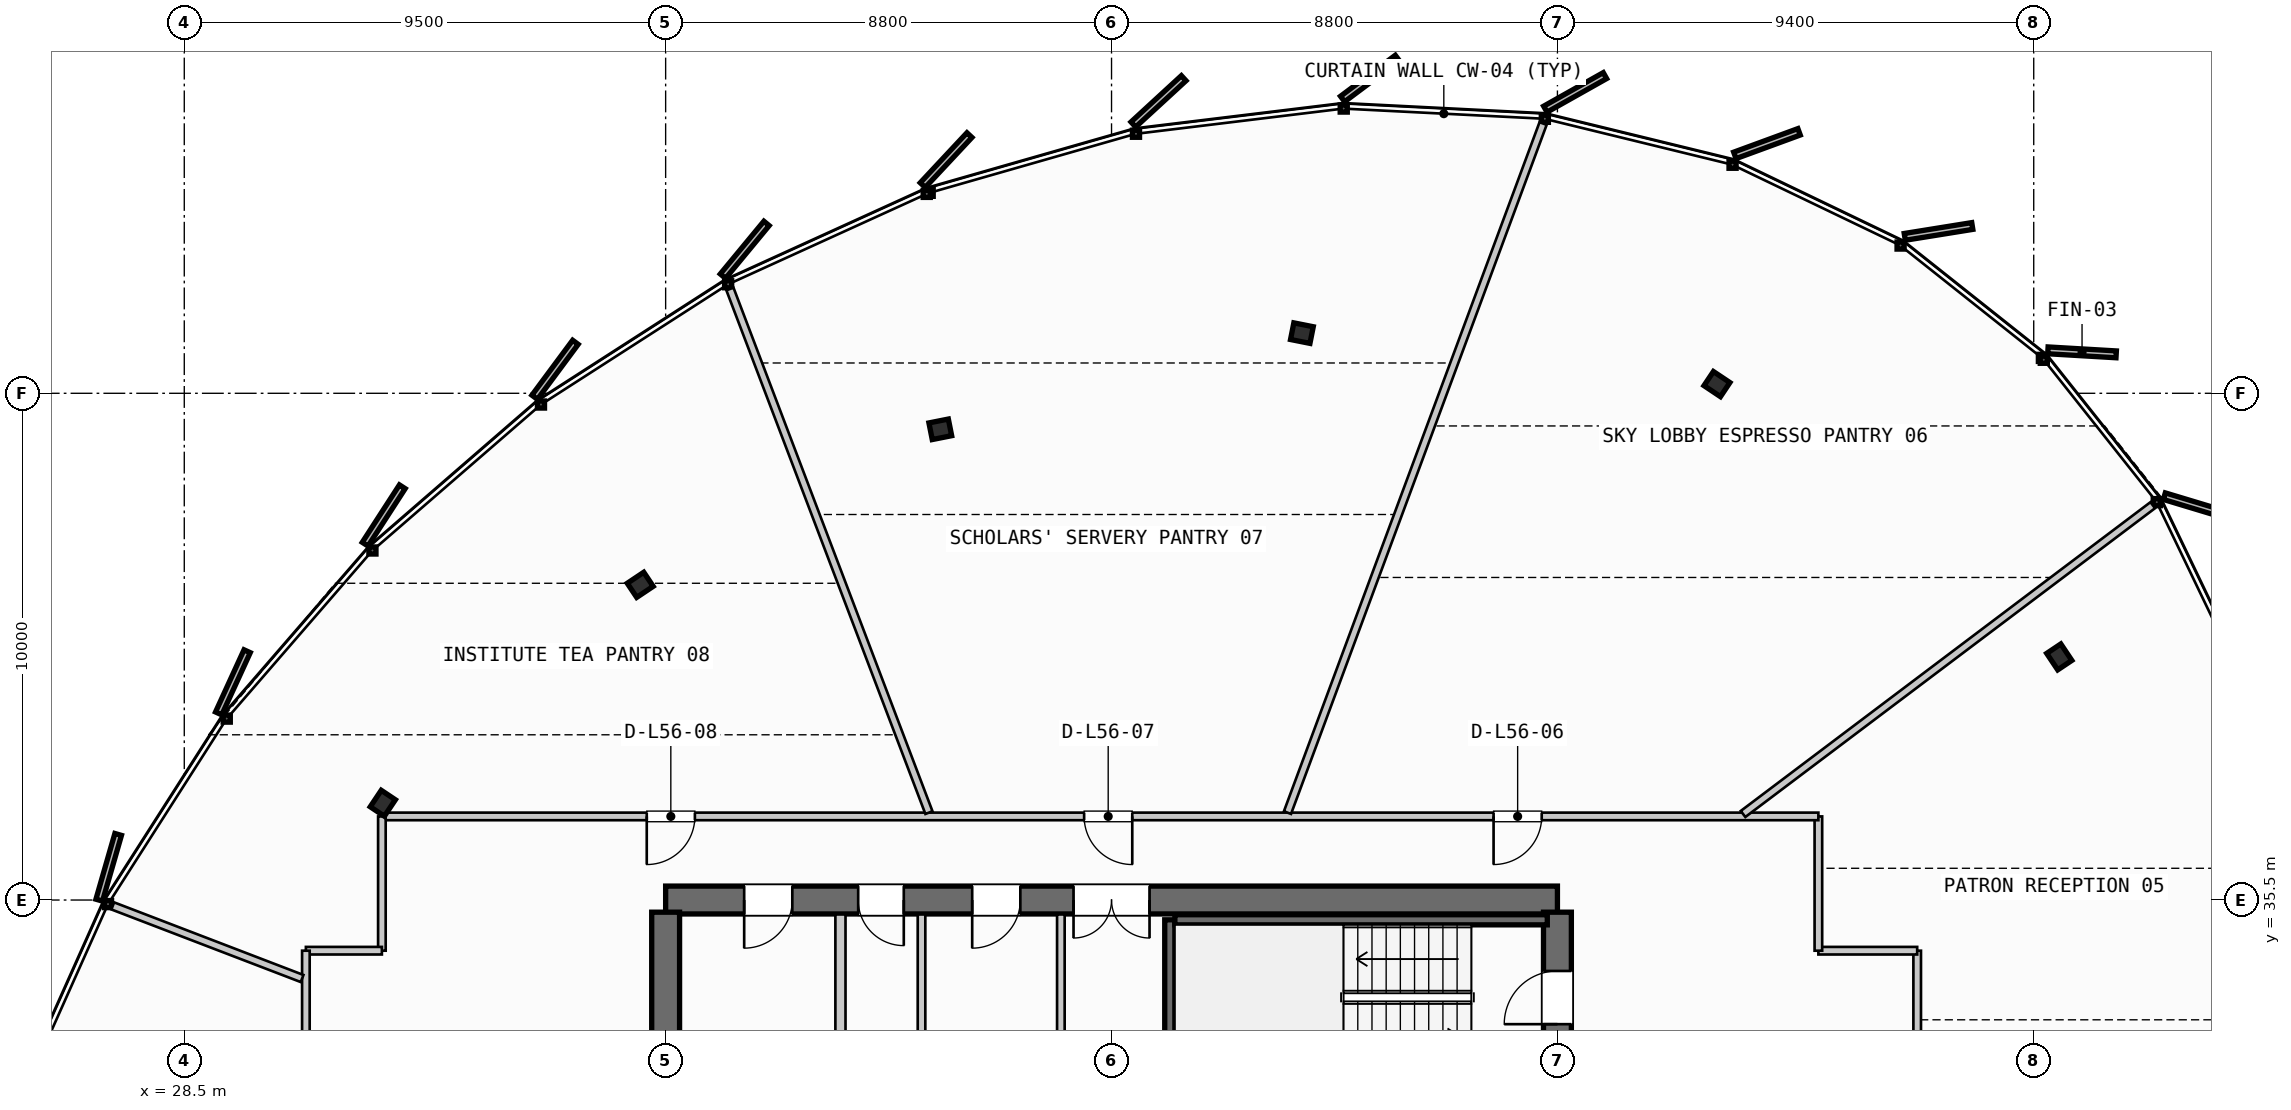
"""IFC4 building model, lengths in metres.
Left out: names, types, materials, properties, quantities, classifications, styles, units other than length and angle.
Written with IfcOpenShell. Run it as: python <this file> out.ifc"""

import sys

from ifc_helpers import new_model, si_unit, direction, frame, frame_2d, origin, origin_2d, place, context, subcontext, project, spatial, rectangle, i_section, extrude, source, transform, mapped, element, fill, save


model = new_model("IFC4")
c1 = context("Model", 3, precision=1e-05, world=origin(), true_north=direction((0.0, 1.0)))
c2 = subcontext(c1, "Body", "Model", "MODEL_VIEW")
j1 = project(units=[si_unit("LENGTHUNIT", "METRE"), si_unit("PLANEANGLEUNIT", "RADIAN")], contexts=[c1])
p1 = place(None, origin())
s1 = spatial("IfcSite", under=j1, at=p1, CompositionType="ELEMENT")
p2 = place(p1, origin())
s2 = spatial("IfcBuilding", under=s1, at=p2, CompositionType="ELEMENT")
p3 = place(p2, frame((0.0, 0.0, 214.9)))
s3 = spatial("IfcBuildingStorey", under=s2, at=p3, CompositionType="ELEMENT", Elevation=214.9)
p4 = place(p3, frame((55.6, 35.5, 0.0), z_axis=(0.0, 0.0, 1.0), x_axis=(-1.0, 0.0, 0.0)))
e1 = element("IfcWall", 1, at=p4, inside=s3, PredefinedType="SHEAR", context=c2, shape_type="SweptSolid", body=[
    extrude(rectangle(XDim=17.6, YDim=0.55, at=frame_2d((8.8, 0.0))), origin(), (0.0, 0.0, 1.0), 3.24),
])
p5 = place(p4, frame((8.05, 0.0, 0.0)))
e2 = element("IfcOpeningElement", 2, at=p5, cuts=e1, PredefinedType="OPENING", context=c2, shape_type="SweptSolid", body=[
    extrude(rectangle(XDim=1.5, YDim=2.2, at=frame_2d((0.75, 1.1))), frame((0.0, 0.285, 0.0), z_axis=(0.0, -1.0, 0.0), x_axis=(1.0, 0.0, 0.0)), (0.0, 0.0, 1.0), 0.57),
])
p6 = place(p4, frame((15.1, 0.0, 0.0)))
e3 = element("IfcOpeningElement", 3, at=p6, cuts=e1, PredefinedType="OPENING", context=c2, shape_type="SweptSolid", body=[
    extrude(rectangle(XDim=0.95, YDim=2.15, at=frame_2d((0.475, 1.075))), frame((0.0, 0.285, 0.0), z_axis=(0.0, -1.0, 0.0), x_axis=(1.0, 0.0, 0.0)), (0.0, 0.0, 1.0), 0.57),
])
p7 = place(p4, frame((12.9, 0.0, 0.0)))
e4 = element("IfcOpeningElement", 4, at=p7, cuts=e1, PredefinedType="OPENING", context=c2, shape_type="SweptSolid", body=[
    extrude(rectangle(XDim=0.9, YDim=2.15, at=frame_2d((0.45, 1.075))), frame((0.0, 0.285, 0.0), z_axis=(0.0, -1.0, 0.0), x_axis=(1.0, 0.0, 0.0)), (0.0, 0.0, 1.0), 0.57),
])
p8 = place(p4, frame((10.6, 0.0, 0.0)))
e5 = element("IfcOpeningElement", 5, at=p8, cuts=e1, PredefinedType="OPENING", context=c2, shape_type="SweptSolid", body=[
    extrude(rectangle(XDim=0.95, YDim=2.15, at=frame_2d((0.475, 1.075))), frame((0.0, 0.285, 0.0), z_axis=(0.0, -1.0, 0.0), x_axis=(1.0, 0.0, 0.0)), (0.0, 0.0, 1.0), 0.57),
])
p9 = place(p3, frame((38.0, 35.26, 0.0), z_axis=(0.0, 0.0, 1.0), x_axis=(0.0, -1.0, 0.0)))
e6 = element("IfcWall", 6, at=p9, inside=s3, PredefinedType="SHEAR", context=c2, shape_type="SweptSolid", body=[
    extrude(rectangle(XDim=14.92, YDim=0.55, at=frame_2d((7.46, 0.0))), origin(), (0.0, 0.0, 1.0), 3.24),
])
p10 = place(p9, frame((5.21, 0.0, 0.0)))
e7 = element("IfcOpeningElement", 7, at=p10, cuts=e6, PredefinedType="OPENING", context=c2, shape_type="SweptSolid", body=[
    extrude(rectangle(XDim=1.1, YDim=2.2, at=frame_2d((0.55, 1.1))), frame((0.0, 0.285, 0.0), z_axis=(0.0, -1.0, 0.0), x_axis=(1.0, 0.0, 0.0)), (0.0, 0.0, 1.0), 0.57),
])
p11 = place(p3, frame((55.6, 20.34, 0.0), z_axis=(0.0, 0.0, 1.0), x_axis=(0.0, 1.0, 0.0)))
e8 = element("IfcWall", 8, at=p11, inside=s3, PredefinedType="SHEAR", context=c2, shape_type="SweptSolid", body=[
    extrude(rectangle(XDim=14.92, YDim=0.55, at=frame_2d((7.46, 0.0))), origin(), (0.0, 0.0, 1.0), 3.24),
])
p12 = place(p11, frame((12.71, 0.0, 0.0)))
e9 = element("IfcOpeningElement", 9, at=p12, cuts=e8, PredefinedType="OPENING", context=c2, shape_type="SweptSolid", body=[
    extrude(rectangle(XDim=1.05, YDim=2.15, at=frame_2d((0.525, 1.075))), frame((0.0, 0.285, 0.0), z_axis=(0.0, -1.0, 0.0), x_axis=(1.0, 0.0, 0.0)), (0.0, 0.0, 1.0), 0.57),
])
p13 = place(p11, frame((8.61, 0.0, 0.0)))
e10 = element("IfcOpeningElement", 10, at=p13, cuts=e8, PredefinedType="OPENING", context=c2, shape_type="SweptSolid", body=[
    extrude(rectangle(XDim=1.1, YDim=2.2, at=frame_2d((0.55, 1.1))), frame((0.0, 0.285, 0.0), z_axis=(0.0, -1.0, 0.0), x_axis=(1.0, 0.0, 0.0)), (0.0, 0.0, 1.0), 0.57),
])
m1 = source(origin(), c2, "Body", "SweptSolid", [
    extrude(i_section(OverallWidth=0.391, OverallDepth=0.335, WebThickness=0.023, FlangeThickness=0.034, FilletRadius=0.015, at=origin_2d()), origin(), (0.0, 0.0, 1.0), 3.24),
])
for number, where, z_axis, x_axis in (
    (11, (65.504, 40.298, 0.0), (0.0, 0.0, 1.0), (0.831, 0.556, 0.0)),
    (12, (58.748, 45.681, 0.0), (0.0, 0.0, 1.0), (0.556, 0.831, 0.0)),
    (13, (50.557, 46.688, 0.0), (0.0, 0.0, 1.0), (0.195, 0.981, 0.0)),
    (14, (43.421, 44.789, 0.0), (0.0, 0.0, 1.0), (-0.195, 0.981, 0.0)),
    (15, (37.499, 41.72, 0.0), (0.0, 0.0, 1.0), (-0.556, 0.831, 0.0)),
    (16, (32.418, 37.409, 0.0), (0.0, 0.0, 1.0), (-0.831, 0.556, 0.0)),
):
    element("IfcColumn", number, at=place(p3, frame(where, z_axis=z_axis, x_axis=x_axis)), inside=s3, PredefinedType="COLUMN", context=c2, shape_type="MappedRepresentation", body=[
        mapped(m1, transform((0.0, 0.0, 0.0), scale=1.0)),
    ])
p14 = place(p3, frame((47.95, 32.05, 0.0), z_axis=(0.0, 0.0, 1.0), x_axis=(0.0, 1.0, 0.0)))
e17 = element("IfcWall", 17, at=p14, inside=s3, PredefinedType="SHEAR", context=c2, shape_type="SweptSolid", body=[
    extrude(rectangle(XDim=3.06, YDim=0.2, at=frame_2d((1.53, 0.0))), origin(), (0.0, 0.0, 1.0), 3.24),
])
p15 = place(p3, frame((48.05, 35.11, 0.0), z_axis=(0.0, 0.0, 1.0), x_axis=(1.0, 0.0, 0.0)))
e18 = element("IfcWall", 18, at=p15, inside=s3, PredefinedType="SHEAR", context=c2, shape_type="SweptSolid", body=[
    extrude(rectangle(XDim=7.35, YDim=0.2, at=frame_2d((3.675, 0.0))), origin(), (0.0, 0.0, 1.0), 3.24),
])
p16 = place(p3, frame((41.45, 31.85, 0.0), z_axis=(0.0, 0.0, 1.0), x_axis=(0.0, 1.0, 0.0)))
e19 = element("IfcWall", 19, at=p16, inside=s3, PredefinedType="PARTITIONING", context=c2, shape_type="SweptSolid", body=[
    extrude(rectangle(XDim=3.365, YDim=0.2, at=frame_2d((1.683, 0.0))), origin(), (0.0, 0.0, 1.0), 2.295),
])
p17 = place(p3, frame((45.8, 31.85, 0.0), z_axis=(0.0, 0.0, 1.0), x_axis=(0.0, 1.0, 0.0)))
e20 = element("IfcWall", 20, at=p17, inside=s3, PredefinedType="PARTITIONING", context=c2, shape_type="SweptSolid", body=[
    extrude(rectangle(XDim=3.365, YDim=0.15, at=frame_2d((1.683, 0.0))), origin(), (0.0, 0.0, 1.0), 2.295),
])
p18 = place(p3, frame((43.05, 31.85, 0.0), z_axis=(0.0, 0.0, 1.0), x_axis=(0.0, 1.0, 0.0)))
e21 = element("IfcWall", 21, at=p18, inside=s3, PredefinedType="PLUMBINGWALL", context=c2, shape_type="SweptSolid", body=[
    extrude(rectangle(XDim=3.365, YDim=0.15, at=frame_2d((1.683, 0.0))), origin(), (0.0, 0.0, 1.0), 2.295),
])
p19 = place(p3, frame((62.7, 32.8, 0.0), z_axis=(0.0, 0.0, 1.0), x_axis=(0.0, 1.0, 0.0)))
e22 = element("IfcWall", 22, at=p19, inside=s3, PredefinedType="PARTITIONING", context=c2, shape_type="SweptSolid", body=[
    extrude(rectangle(XDim=1.7, YDim=0.15, at=frame_2d((0.85, 0.0))), origin(), (0.0, 0.0, 1.0), 2.295),
])
p20 = place(p3, frame((62.7, 34.5, 0.0), z_axis=(0.0, 0.0, 1.0), x_axis=(-1.0, 0.0, 0.0)))
e23 = element("IfcWall", 23, at=p20, inside=s3, PredefinedType="PARTITIONING", context=c2, shape_type="SweptSolid", body=[
    extrude(rectangle(XDim=1.95, YDim=0.15, at=frame_2d((0.975, 0.0))), origin(), (0.0, 0.0, 1.0), 2.295),
])
p21 = place(p3, frame((60.75, 34.5, 0.0), z_axis=(0.0, 0.0, 1.0), x_axis=(0.0, 1.0, 0.0)))
e24 = element("IfcWall", 24, at=p21, inside=s3, PredefinedType="PARTITIONING", context=c2, shape_type="SweptSolid", body=[
    extrude(rectangle(XDim=2.65, YDim=0.15, at=frame_2d((1.325, 0.0))), origin(), (0.0, 0.0, 1.0), 2.295),
])
p22 = place(p3, frame((60.75, 37.15, 0.0), z_axis=(0.0, 0.0, 1.0), x_axis=(-1.0, 0.0, 0.0)))
e25 = element("IfcWall", 25, at=p22, inside=s3, PredefinedType="PARTITIONING", context=c2, shape_type="SweptSolid", body=[
    extrude(rectangle(XDim=28.35, YDim=0.15, at=frame_2d((14.175, 0.0))), origin(), (0.0, 0.0, 1.0), 2.295),
])
p23 = place(p22, frame((5.46, 0.0, 0.0)))
e26 = element("IfcOpeningElement", 26, at=p23, cuts=e25, PredefinedType="OPENING", context=c2, shape_type="SweptSolid", body=[
    extrude(rectangle(XDim=0.95, YDim=2.15, at=frame_2d((0.475, 1.075))), frame((0.0, 0.085, 0.0), z_axis=(0.0, -1.0, 0.0), x_axis=(1.0, 0.0, 0.0)), (0.0, 0.0, 1.0), 0.17),
])
p24 = place(p22, frame((13.541, 0.0, 0.0)))
e27 = element("IfcOpeningElement", 27, at=p24, cuts=e25, PredefinedType="OPENING", context=c2, shape_type="SweptSolid", body=[
    extrude(rectangle(XDim=0.95, YDim=2.15, at=frame_2d((0.475, 1.075))), frame((0.0, 0.085, 0.0), z_axis=(0.0, -1.0, 0.0), x_axis=(1.0, 0.0, 0.0)), (0.0, 0.0, 1.0), 0.17),
])
p25 = place(p22, frame((22.173, 0.0, 0.0)))
e28 = element("IfcOpeningElement", 28, at=p25, cuts=e25, PredefinedType="OPENING", context=c2, shape_type="SweptSolid", body=[
    extrude(rectangle(XDim=0.95, YDim=2.15, at=frame_2d((0.475, 1.075))), frame((0.0, 0.085, 0.0), z_axis=(0.0, -1.0, 0.0), x_axis=(1.0, 0.0, 0.0)), (0.0, 0.0, 1.0), 0.17),
])
p26 = place(p3, frame((32.4, 37.15, 0.0), z_axis=(0.0, 0.0, 1.0), x_axis=(0.0, -1.0, 0.0)))
e29 = element("IfcWall", 29, at=p26, inside=s3, PredefinedType="PARTITIONING", context=c2, shape_type="SweptSolid", body=[
    extrude(rectangle(XDim=2.65, YDim=0.15, at=frame_2d((1.325, 0.0))), origin(), (0.0, 0.0, 1.0), 2.295),
])
p27 = place(p3, frame((32.4, 34.5, 0.0), z_axis=(0.0, 0.0, 1.0), x_axis=(-1.0, 0.0, 0.0)))
e30 = element("IfcWall", 30, at=p27, inside=s3, PredefinedType="PARTITIONING", context=c2, shape_type="SweptSolid", body=[
    extrude(rectangle(XDim=1.5, YDim=0.15, at=frame_2d((0.75, 0.0))), origin(), (0.0, 0.0, 1.0), 2.295),
])
p28 = place(p3, frame((30.9, 34.5, 0.0), z_axis=(0.0, 0.0, 1.0), x_axis=(0.0, -1.0, 0.0)))
e31 = element("IfcWall", 31, at=p28, inside=s3, PredefinedType="PARTITIONING", context=c2, shape_type="SweptSolid", body=[
    extrude(rectangle(XDim=1.7, YDim=0.15, at=frame_2d((0.85, 0.0))), origin(), (0.0, 0.0, 1.0), 2.295),
])
p29 = place(p3, frame((59.263, 37.198, 0.0), z_axis=(0.0, 0.0, 1.0), x_axis=(0.798603092388, 0.601858040428, 0.0)))
e32 = element("IfcWall", 32, at=p29, inside=s3, PredefinedType="PARTITIONING", context=c2, shape_type="SweptSolid", body=[
    extrude(rectangle(XDim=10.125, YDim=0.15, at=frame_2d((5.062, 0.0))), origin(), (0.0, 0.0, 1.0), 2.295),
])
p30 = place(p3, frame((50.272, 37.225, 0.0), z_axis=(0.0, 0.0, 1.0), x_axis=(0.347798947375, 0.93756913996, 0.0)))
e33 = element("IfcWall", 33, at=p30, inside=s3, PredefinedType="PARTITIONING", context=c2, shape_type="SweptSolid", body=[
    extrude(rectangle(XDim=14.504, YDim=0.15, at=frame_2d((7.252, 0.0))), origin(), (0.0, 0.0, 1.0), 2.295),
])
p31 = place(p3, frame((43.196, 37.225, 0.0), z_axis=(0.0, 0.0, 1.0), x_axis=(-0.355266006866, 0.934765245592, 0.0)))
e34 = element("IfcWall", 34, at=p31, inside=s3, PredefinedType="PARTITIONING", context=c2, shape_type="SweptSolid", body=[
    extrude(rectangle(XDim=11.054, YDim=0.15, at=frame_2d((5.527, 0.0))), origin(), (0.0, 0.0, 1.0), 2.295),
])
p32 = place(p3, frame((30.825, 33.951, 0.0), z_axis=(0.0, 0.0, 1.0), x_axis=(-0.933691058524, 0.358079610188, 0.0)))
e35 = element("IfcWall", 35, at=p32, inside=s3, PredefinedType="PARTITIONING", context=c2, shape_type="SweptSolid", body=[
    extrude(rectangle(XDim=4.002, YDim=0.15, at=frame_2d((2.001, 0.0))), origin(), (0.0, 0.0, 1.0), 2.295),
])
m2 = source(origin(), c2, "Body", "SweptSolid", [
    extrude(rectangle(XDim=1.05, YDim=2.15, at=frame_2d((0.525, 1.075))), frame((0.0, 0.025, 0.0), z_axis=(0.0, -1.0, 0.0), x_axis=(1.0, 0.0, 0.0)), (0.0, 0.0, 1.0), 0.05),
])
p33 = place(p12, origin())
e36 = element("IfcDoor", 36, at=p33, inside=s3, OperationType="SINGLE_SWING_LEFT", PredefinedType="DOOR", context=c2, shape_type="MappedRepresentation", body=[
    mapped(m2, transform((0.0, 0.0, 0.0), scale=1.0)),
])
fill(e9, e36)
m3 = source(origin(), c2, "Body", "SweptSolid", [
    extrude(rectangle(XDim=1.5, YDim=2.2, at=frame_2d((0.75, 1.1))), frame((0.0, 0.025, 0.0), z_axis=(0.0, -1.0, 0.0), x_axis=(1.0, 0.0, 0.0)), (0.0, 0.0, 1.0), 0.05),
])
p34 = place(p5, origin())
e37 = element("IfcDoor", 37, at=p34, inside=s3, OperationType="DOUBLE_DOOR_SINGLE_SWING", PredefinedType="DOOR", context=c2, shape_type="MappedRepresentation", body=[
    mapped(m3, transform((0.0, 0.0, 0.0), scale=1.0)),
])
fill(e2, e37)
m4 = source(origin(), c2, "Body", "SweptSolid", [
    extrude(rectangle(XDim=0.95, YDim=2.15, at=frame_2d((0.475, 1.075))), frame((0.0, 0.025, 0.0), z_axis=(0.0, -1.0, 0.0), x_axis=(1.0, 0.0, 0.0)), (0.0, 0.0, 1.0), 0.05),
])
p35 = place(p6, origin())
e38 = element("IfcDoor", 38, at=p35, inside=s3, OperationType="SINGLE_SWING_RIGHT", PredefinedType="DOOR", context=c2, shape_type="MappedRepresentation", body=[
    mapped(m4, transform((0.0, 0.0, 0.0), scale=1.0)),
])
fill(e3, e38)
m5 = source(origin(), c2, "Body", "SweptSolid", [
    extrude(rectangle(XDim=0.9, YDim=2.15, at=frame_2d((0.45, 1.075))), frame((0.0, 0.025, 0.0), z_axis=(0.0, -1.0, 0.0), x_axis=(1.0, 0.0, 0.0)), (0.0, 0.0, 1.0), 0.05),
])
p36 = place(p7, origin())
e39 = element("IfcDoor", 39, at=p36, inside=s3, OperationType="SINGLE_SWING_LEFT", PredefinedType="DOOR", context=c2, shape_type="MappedRepresentation", body=[
    mapped(m5, transform((0.0, 0.0, 0.0), scale=1.0)),
])
fill(e4, e39)
p37 = place(p8, origin())
e40 = element("IfcDoor", 40, at=p37, inside=s3, OperationType="SINGLE_SWING_RIGHT", PredefinedType="DOOR", context=c2, shape_type="MappedRepresentation", body=[
    mapped(m4, transform((0.0, 0.0, 0.0), scale=1.0)),
])
fill(e5, e40)
p38 = place(p23, origin())
e41 = element("IfcDoor", 41, at=p38, inside=s3, OperationType="SINGLE_SWING_RIGHT", PredefinedType="DOOR", context=c2, shape_type="MappedRepresentation", body=[
    mapped(m4, transform((0.0, 0.0, 0.0), scale=1.0)),
])
fill(e26, e41)
p39 = place(p24, origin())
e42 = element("IfcDoor", 42, at=p39, inside=s3, OperationType="SINGLE_SWING_LEFT", PredefinedType="DOOR", context=c2, shape_type="MappedRepresentation", body=[
    mapped(m4, transform((0.0, 0.0, 0.0), scale=1.0)),
])
fill(e27, e42)
p40 = place(p25, origin())
e43 = element("IfcDoor", 43, at=p40, inside=s3, OperationType="SINGLE_SWING_RIGHT", PredefinedType="DOOR", context=c2, shape_type="MappedRepresentation", body=[
    mapped(m4, transform((0.0, 0.0, 0.0), scale=1.0)),
])
fill(e28, e43)
save(model, sys.argv[1])
